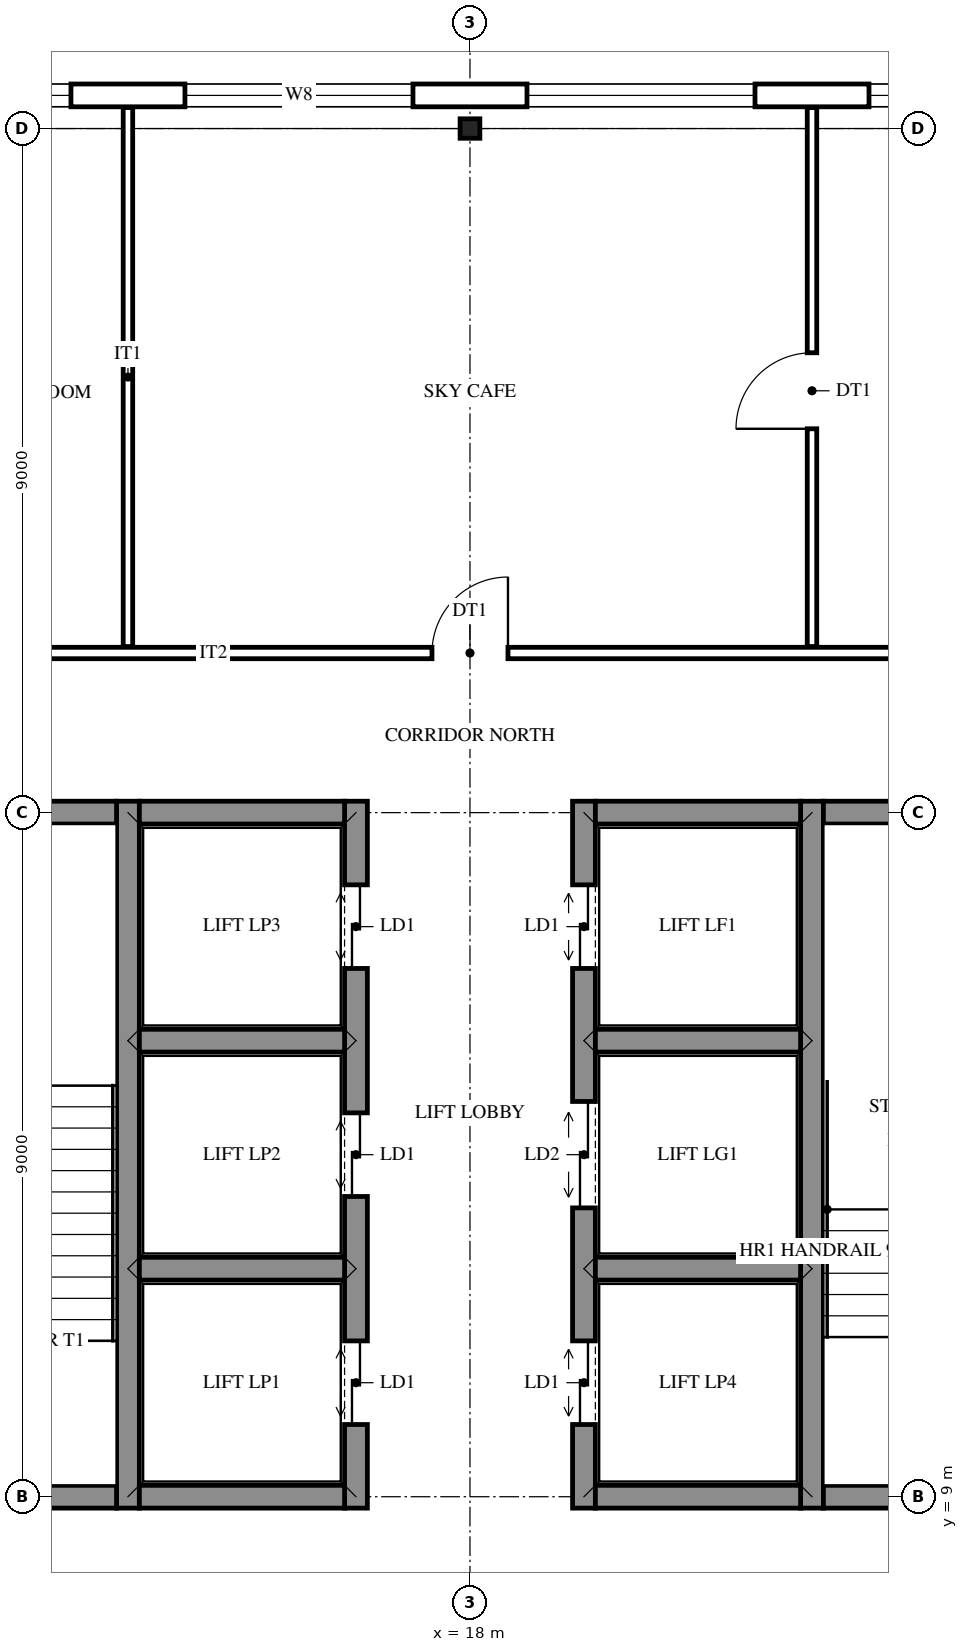
"""IFC4 building model, lengths in metres.
Left out: names, types, materials, properties, quantities, classifications, styles, units other than length and angle.
Written with IfcOpenShell. Run it as: python <this file> out.ifc"""

import sys

from ifc_helpers import new_model, si_unit, direction, frame, frame_2d, origin, origin_2d, place, context, subcontext, project, spatial, rectangle, i_section, extrude, element, fill, save


model = new_model("IFC4")
c1 = context("Model", 3, precision=1e-05, world=origin(), true_north=direction((0.0, 1.0)))
c2 = subcontext(c1, "Body", "Model", "MODEL_VIEW")
j1 = project(units=[si_unit("LENGTHUNIT", "METRE"), si_unit("PLANEANGLEUNIT", "RADIAN")], contexts=[c1])
p1 = place(None, origin())
s1 = spatial("IfcSite", under=j1, at=p1, CompositionType="ELEMENT")
p2 = place(p1, origin())
s2 = spatial("IfcBuilding", under=s1, at=p2, CompositionType="ELEMENT")
p3 = place(p2, frame((0.0, 0.0, 65.4)))
s3 = spatial("IfcBuildingStorey", under=s2, at=p3, CompositionType="ELEMENT", Elevation=65.4)
p4 = place(p3, frame((18.0, 27.0, 0.0), z_axis=(0.0, 0.0, 1.0), x_axis=(0.0, 1.0, 0.0)))
e1 = element("IfcColumn", 1, at=p4, inside=s3, PredefinedType="COLUMN", context=c2, shape_type="SweptSolid", body=[
    extrude(i_section(OverallWidth=0.256, OverallDepth=0.26, WebThickness=0.01, FlangeThickness=0.017, FilletRadius=0.014, at=origin_2d()), origin(), (0.0, 0.0, 1.0), 4.5),
])
p5 = place(p3, frame((13.5, 8.85, 0.0), z_axis=(0.0, 0.0, 1.0), x_axis=(0.0, 1.0, 0.0)))
e2 = element("IfcWall", 2, at=p5, inside=s3, PredefinedType="SHEAR", context=c2, shape_type="SweptSolid", body=[
    extrude(rectangle(XDim=9.3, YDim=0.3, at=frame_2d((4.65, 0.0))), origin(), (0.0, 0.0, 1.0), 4.5),
])
p6 = place(p3, frame((16.5, 8.85, 0.0), z_axis=(0.0, 0.0, 1.0), x_axis=(0.0, 1.0, 0.0)))
e3 = element("IfcWall", 3, at=p6, inside=s3, PredefinedType="SHEAR", context=c2, shape_type="SweptSolid", body=[
    extrude(rectangle(XDim=9.3, YDim=0.3, at=frame_2d((4.65, 0.0))), origin(), (0.0, 0.0, 1.0), 4.5),
])
p7 = place(p6, frame((1.1, 0.0, 0.0)))
e4 = element("IfcOpeningElement", 4, at=p7, cuts=e3, PredefinedType="OPENING", context=c2, shape_type="SweptSolid", body=[
    extrude(rectangle(XDim=1.1, YDim=2.1, at=frame_2d((0.55, 1.05))), frame((0.0, 0.16, 0.0), z_axis=(0.0, -1.0, 0.0), x_axis=(1.0, 0.0, 0.0)), (0.0, 0.0, 1.0), 0.32),
])
p8 = place(p6, frame((4.1, 0.0, 0.0)))
e5 = element("IfcOpeningElement", 5, at=p8, cuts=e3, PredefinedType="OPENING", context=c2, shape_type="SweptSolid", body=[
    extrude(rectangle(XDim=1.1, YDim=2.1, at=frame_2d((0.55, 1.05))), frame((0.0, 0.16, 0.0), z_axis=(0.0, -1.0, 0.0), x_axis=(1.0, 0.0, 0.0)), (0.0, 0.0, 1.0), 0.32),
])
p9 = place(p6, frame((7.1, 0.0, 0.0)))
e6 = element("IfcOpeningElement", 6, at=p9, cuts=e3, PredefinedType="OPENING", context=c2, shape_type="SweptSolid", body=[
    extrude(rectangle(XDim=1.1, YDim=2.1, at=frame_2d((0.55, 1.05))), frame((0.0, 0.16, 0.0), z_axis=(0.0, -1.0, 0.0), x_axis=(1.0, 0.0, 0.0)), (0.0, 0.0, 1.0), 0.32),
])
p10 = place(p3, frame((19.5, 8.85, 0.0), z_axis=(0.0, 0.0, 1.0), x_axis=(0.0, 1.0, 0.0)))
e7 = element("IfcWall", 7, at=p10, inside=s3, PredefinedType="SHEAR", context=c2, shape_type="SweptSolid", body=[
    extrude(rectangle(XDim=9.3, YDim=0.3, at=frame_2d((4.65, 0.0))), origin(), (0.0, 0.0, 1.0), 4.5),
])
p11 = place(p10, frame((1.1, 0.0, 0.0)))
e8 = element("IfcOpeningElement", 8, at=p11, cuts=e7, PredefinedType="OPENING", context=c2, shape_type="SweptSolid", body=[
    extrude(rectangle(XDim=1.1, YDim=2.1, at=frame_2d((0.55, 1.05))), frame((0.0, 0.16, 0.0), z_axis=(0.0, -1.0, 0.0), x_axis=(1.0, 0.0, 0.0)), (0.0, 0.0, 1.0), 0.32),
])
p12 = place(p10, frame((3.95, 0.0, 0.0)))
e9 = element("IfcOpeningElement", 9, at=p12, cuts=e7, PredefinedType="OPENING", context=c2, shape_type="SweptSolid", body=[
    extrude(rectangle(XDim=1.4, YDim=2.1, at=frame_2d((0.7, 1.05))), frame((0.0, 0.16, 0.0), z_axis=(0.0, -1.0, 0.0), x_axis=(1.0, 0.0, 0.0)), (0.0, 0.0, 1.0), 0.32),
])
p13 = place(p10, frame((7.1, 0.0, 0.0)))
e10 = element("IfcOpeningElement", 10, at=p13, cuts=e7, PredefinedType="OPENING", context=c2, shape_type="SweptSolid", body=[
    extrude(rectangle(XDim=1.1, YDim=2.1, at=frame_2d((0.55, 1.05))), frame((0.0, 0.16, 0.0), z_axis=(0.0, -1.0, 0.0), x_axis=(1.0, 0.0, 0.0)), (0.0, 0.0, 1.0), 0.32),
])
p14 = place(p3, frame((22.5, 8.85, 0.0), z_axis=(0.0, 0.0, 1.0), x_axis=(0.0, 1.0, 0.0)))
e11 = element("IfcWall", 11, at=p14, inside=s3, PredefinedType="SHEAR", context=c2, shape_type="SweptSolid", body=[
    extrude(rectangle(XDim=9.3, YDim=0.3, at=frame_2d((4.65, 0.0))), origin(), (0.0, 0.0, 1.0), 4.5),
])
p15 = place(p3, frame((9.15, 9.0, 0.0), z_axis=(0.0, 0.0, 1.0), x_axis=(1.0, 0.0, 0.0)))
e12 = element("IfcWall", 12, at=p15, inside=s3, PredefinedType="SHEAR", context=c2, shape_type="SweptSolid", body=[
    extrude(rectangle(XDim=4.2, YDim=0.3, at=frame_2d((2.1, 0.0))), origin(), (0.0, 0.0, 1.0), 4.5),
])
p16 = place(p15, frame((1.5, 0.0, 0.0)))
e13 = element("IfcOpeningElement", 13, at=p16, cuts=e12, PredefinedType="OPENING", context=c2, shape_type="SweptSolid", body=[
    extrude(rectangle(XDim=1.2, YDim=2.1, at=frame_2d((0.6, 1.05))), frame((0.0, 0.16, 0.0), z_axis=(0.0, -1.0, 0.0), x_axis=(1.0, 0.0, 0.0)), (0.0, 0.0, 1.0), 0.32),
])
for number, where, z_axis, x_axis in (
    (14, (13.65, 9.0, 0.0), (0.0, 0.0, 1.0), (1.0, 0.0, 0.0)),
    (15, (19.65, 9.0, 0.0), (0.0, 0.0, 1.0), (1.0, 0.0, 0.0)),
):
    element("IfcWall", number, at=place(p3, frame(where, z_axis=z_axis, x_axis=x_axis)), inside=s3, PredefinedType="SHEAR", context=c2, shape_type="SweptSolid", body=[
        extrude(rectangle(XDim=2.7, YDim=0.3, at=frame_2d((1.35, 0.0))), origin(), (0.0, 0.0, 1.0), 4.5),
    ])
p17 = place(p3, frame((22.65, 9.0, 0.0), z_axis=(0.0, 0.0, 1.0), x_axis=(1.0, 0.0, 0.0)))
e16 = element("IfcWall", 16, at=p17, inside=s3, PredefinedType="SHEAR", context=c2, shape_type="SweptSolid", body=[
    extrude(rectangle(XDim=4.2, YDim=0.3, at=frame_2d((2.1, 0.0))), origin(), (0.0, 0.0, 1.0), 4.5),
])
p18 = place(p17, frame((1.5, 0.0, 0.0)))
e17 = element("IfcOpeningElement", 17, at=p18, cuts=e16, PredefinedType="OPENING", context=c2, shape_type="SweptSolid", body=[
    extrude(rectangle(XDim=1.2, YDim=2.1, at=frame_2d((0.6, 1.05))), frame((0.0, 0.16, 0.0), z_axis=(0.0, -1.0, 0.0), x_axis=(1.0, 0.0, 0.0)), (0.0, 0.0, 1.0), 0.32),
])
for number, where, z_axis, x_axis in (
    (18, (13.65, 12.0, 0.0), (0.0, 0.0, 1.0), (1.0, 0.0, 0.0)),
    (19, (19.65, 12.0, 0.0), (0.0, 0.0, 1.0), (1.0, 0.0, 0.0)),
    (20, (13.65, 15.0, 0.0), (0.0, 0.0, 1.0), (1.0, 0.0, 0.0)),
    (21, (19.65, 15.0, 0.0), (0.0, 0.0, 1.0), (1.0, 0.0, 0.0)),
):
    element("IfcWall", number, at=place(p3, frame(where, z_axis=z_axis, x_axis=x_axis)), inside=s3, PredefinedType="SHEAR", context=c2, shape_type="SweptSolid", body=[
        extrude(rectangle(XDim=2.7, YDim=0.3, at=frame_2d((1.35, 0.0))), origin(), (0.0, 0.0, 1.0), 4.5),
    ])
p19 = place(p3, frame((9.15, 18.0, 0.0), z_axis=(0.0, 0.0, 1.0), x_axis=(1.0, 0.0, 0.0)))
e22 = element("IfcWall", 22, at=p19, inside=s3, PredefinedType="SHEAR", context=c2, shape_type="SweptSolid", body=[
    extrude(rectangle(XDim=4.2, YDim=0.3, at=frame_2d((2.1, 0.0))), origin(), (0.0, 0.0, 1.0), 4.5),
])
for number, where, z_axis, x_axis in (
    (23, (13.65, 18.0, 0.0), (0.0, 0.0, 1.0), (1.0, 0.0, 0.0)),
    (24, (19.65, 18.0, 0.0), (0.0, 0.0, 1.0), (1.0, 0.0, 0.0)),
):
    element("IfcWall", number, at=place(p3, frame(where, z_axis=z_axis, x_axis=x_axis)), inside=s3, PredefinedType="SHEAR", context=c2, shape_type="SweptSolid", body=[
        extrude(rectangle(XDim=2.7, YDim=0.3, at=frame_2d((1.35, 0.0))), origin(), (0.0, 0.0, 1.0), 4.5),
    ])
p20 = place(p3, frame((22.65, 18.0, 0.0), z_axis=(0.0, 0.0, 1.0), x_axis=(1.0, 0.0, 0.0)))
e25 = element("IfcWall", 25, at=p20, inside=s3, PredefinedType="SHEAR", context=c2, shape_type="SweptSolid", body=[
    extrude(rectangle(XDim=4.2, YDim=0.3, at=frame_2d((2.1, 0.0))), origin(), (0.0, 0.0, 1.0), 4.5),
])
p21 = place(p3, frame((8.414, 27.436, 0.0), z_axis=(0.0, 0.0, 1.0), x_axis=(1.0, 0.0, 0.0)))
e26 = element("IfcWall", 26, at=p21, inside=s3, PredefinedType="STANDARD", context=c2, shape_type="SweptSolid", body=[
    extrude(rectangle(XDim=19.172, YDim=0.3, at=frame_2d((9.586, 0.0))), origin(), (0.0, 0.0, 1.0), 4.5),
])
p22 = place(p21, frame((1.336, 0.0, 0.6)))
e27 = element("IfcOpeningElement", 27, at=p22, cuts=e26, PredefinedType="OPENING", context=c2, shape_type="SweptSolid", body=[
    extrude(rectangle(XDim=3.0, YDim=3.1, at=frame_2d((1.5, 1.55))), frame((0.0, 0.16, 0.0), z_axis=(0.0, -1.0, 0.0), x_axis=(1.0, 0.0, 0.0)), (0.0, 0.0, 1.0), 0.32),
])
p23 = place(p21, frame((5.836, 0.0, 0.6)))
e28 = element("IfcOpeningElement", 28, at=p23, cuts=e26, PredefinedType="OPENING", context=c2, shape_type="SweptSolid", body=[
    extrude(rectangle(XDim=3.0, YDim=3.1, at=frame_2d((1.5, 1.55))), frame((0.0, 0.16, 0.0), z_axis=(0.0, -1.0, 0.0), x_axis=(1.0, 0.0, 0.0)), (0.0, 0.0, 1.0), 0.32),
])
p24 = place(p21, frame((10.336, 0.0, 0.6)))
e29 = element("IfcOpeningElement", 29, at=p24, cuts=e26, PredefinedType="OPENING", context=c2, shape_type="SweptSolid", body=[
    extrude(rectangle(XDim=3.0, YDim=3.1, at=frame_2d((1.5, 1.55))), frame((0.0, 0.16, 0.0), z_axis=(0.0, -1.0, 0.0), x_axis=(1.0, 0.0, 0.0)), (0.0, 0.0, 1.0), 0.32),
])
p25 = place(p21, frame((14.836, 0.0, 0.6)))
e30 = element("IfcOpeningElement", 30, at=p25, cuts=e26, PredefinedType="OPENING", context=c2, shape_type="SweptSolid", body=[
    extrude(rectangle(XDim=3.0, YDim=3.1, at=frame_2d((1.5, 1.55))), frame((0.0, 0.16, 0.0), z_axis=(0.0, -1.0, 0.0), x_axis=(1.0, 0.0, 0.0)), (0.0, 0.0, 1.0), 0.32),
])
p26 = place(p3, frame((13.5, 20.185, 0.0), z_axis=(0.0, 0.0, 1.0), x_axis=(0.0, 1.0, 0.0)))
e31 = element("IfcWall", 31, at=p26, inside=s3, PredefinedType="PARTITIONING", context=c2, shape_type="SweptSolid", body=[
    extrude(rectangle(XDim=7.091, YDim=0.125, at=frame_2d((3.545, 0.0))), origin(), (0.0, 0.0, 1.0), 3.723),
])
p27 = place(p3, frame((22.5, 20.185, 0.0), z_axis=(0.0, 0.0, 1.0), x_axis=(0.0, 1.0, 0.0)))
e32 = element("IfcWall", 32, at=p27, inside=s3, PredefinedType="PARTITIONING", context=c2, shape_type="SweptSolid", body=[
    extrude(rectangle(XDim=7.091, YDim=0.125, at=frame_2d((3.545, 0.0))), origin(), (0.0, 0.0, 1.0), 3.723),
])
p28 = place(p27, frame((2.865, 0.0, 0.0)))
e33 = element("IfcOpeningElement", 33, at=p28, cuts=e32, PredefinedType="OPENING", context=c2, shape_type="SweptSolid", body=[
    extrude(rectangle(XDim=1.0, YDim=2.1, at=frame_2d((0.5, 1.05))), frame((0.0, 0.073, 0.0), z_axis=(0.0, -1.0, 0.0), x_axis=(1.0, 0.0, 0.0)), (0.0, 0.0, 1.0), 0.145),
])
p29 = place(p3, frame((8.724, 20.1, 0.0), z_axis=(0.0, 0.0, 1.0), x_axis=(1.0, 0.0, 0.0)))
e34 = element("IfcWall", 34, at=p29, inside=s3, PredefinedType="PARTITIONING", context=c2, shape_type="SweptSolid", body=[
    extrude(rectangle(XDim=18.552, YDim=0.15, at=frame_2d((9.276, 0.0))), origin(), (0.0, 0.0, 1.0), 3.723),
])
p30 = place(p29, frame((2.026, 0.0, 0.0)))
e35 = element("IfcOpeningElement", 35, at=p30, cuts=e34, PredefinedType="OPENING", context=c2, shape_type="SweptSolid", body=[
    extrude(rectangle(XDim=1.0, YDim=2.1, at=frame_2d((0.5, 1.05))), frame((0.0, 0.085, 0.0), z_axis=(0.0, -1.0, 0.0), x_axis=(1.0, 0.0, 0.0)), (0.0, 0.0, 1.0), 0.17),
])
p31 = place(p29, frame((8.776, 0.0, 0.0)))
e36 = element("IfcOpeningElement", 36, at=p31, cuts=e34, PredefinedType="OPENING", context=c2, shape_type="SweptSolid", body=[
    extrude(rectangle(XDim=1.0, YDim=2.1, at=frame_2d((0.5, 1.05))), frame((0.0, 0.085, 0.0), z_axis=(0.0, -1.0, 0.0), x_axis=(1.0, 0.0, 0.0)), (0.0, 0.0, 1.0), 0.17),
])
p32 = place(p29, frame((15.526, 0.0, 0.0)))
e37 = element("IfcOpeningElement", 37, at=p32, cuts=e34, PredefinedType="OPENING", context=c2, shape_type="SweptSolid", body=[
    extrude(rectangle(XDim=1.0, YDim=2.1, at=frame_2d((0.5, 1.05))), frame((0.0, 0.085, 0.0), z_axis=(0.0, -1.0, 0.0), x_axis=(1.0, 0.0, 0.0)), (0.0, 0.0, 1.0), 0.17),
])
p33 = place(p22, origin())
e38 = element("IfcWindow", 38, at=p33, inside=s3, PartitioningType="SINGLE_PANEL", PredefinedType="WINDOW", context=c2, shape_type="SweptSolid", body=[
    extrude(rectangle(XDim=3.0, YDim=3.1, at=frame_2d((1.5, 1.55))), frame((0.0, 0.03, 0.0), z_axis=(0.0, -1.0, 0.0), x_axis=(1.0, 0.0, 0.0)), (0.0, 0.0, 1.0), 0.06),
])
fill(e27, e38)
p34 = place(p23, origin())
e39 = element("IfcWindow", 39, at=p34, inside=s3, PartitioningType="SINGLE_PANEL", PredefinedType="WINDOW", context=c2, shape_type="SweptSolid", body=[
    extrude(rectangle(XDim=3.0, YDim=3.1, at=frame_2d((1.5, 1.55))), frame((0.0, 0.03, 0.0), z_axis=(0.0, -1.0, 0.0), x_axis=(1.0, 0.0, 0.0)), (0.0, 0.0, 1.0), 0.06),
])
fill(e28, e39)
p35 = place(p24, origin())
e40 = element("IfcWindow", 40, at=p35, inside=s3, PartitioningType="SINGLE_PANEL", PredefinedType="WINDOW", context=c2, shape_type="SweptSolid", body=[
    extrude(rectangle(XDim=3.0, YDim=3.1, at=frame_2d((1.5, 1.55))), frame((0.0, 0.03, 0.0), z_axis=(0.0, -1.0, 0.0), x_axis=(1.0, 0.0, 0.0)), (0.0, 0.0, 1.0), 0.06),
])
fill(e29, e40)
p36 = place(p25, origin())
e41 = element("IfcWindow", 41, at=p36, inside=s3, PartitioningType="SINGLE_PANEL", PredefinedType="WINDOW", context=c2, shape_type="SweptSolid", body=[
    extrude(rectangle(XDim=3.0, YDim=3.1, at=frame_2d((1.5, 1.55))), frame((0.0, 0.03, 0.0), z_axis=(0.0, -1.0, 0.0), x_axis=(1.0, 0.0, 0.0)), (0.0, 0.0, 1.0), 0.06),
])
fill(e30, e41)
p37 = place(p31, origin())
e42 = element("IfcDoor", 42, at=p37, inside=s3, OperationType="SINGLE_SWING_RIGHT", PredefinedType="DOOR", context=c2, shape_type="SweptSolid", body=[
    extrude(rectangle(XDim=1.0, YDim=2.1, at=frame_2d((0.5, 1.05))), frame((0.0, 0.025, 0.0), z_axis=(0.0, -1.0, 0.0), x_axis=(1.0, 0.0, 0.0)), (0.0, 0.0, 1.0), 0.05),
])
fill(e36, e42)
p38 = place(p28, frame((1.0, 0.0, 0.0), z_axis=(0.0, 0.0, 1.0), x_axis=(-1.0, 0.0, 0.0)))
e43 = element("IfcDoor", 43, at=p38, inside=s3, OperationType="SINGLE_SWING_LEFT", PredefinedType="DOOR", context=c2, shape_type="SweptSolid", body=[
    extrude(rectangle(XDim=1.0, YDim=2.1, at=frame_2d((0.5, 1.05))), frame((0.0, 0.025, 0.0), z_axis=(0.0, -1.0, 0.0), x_axis=(1.0, 0.0, 0.0)), (0.0, 0.0, 1.0), 0.05),
])
fill(e33, e43)
p39 = place(p7, origin())
e44 = element("IfcDoor", 44, at=p39, inside=s3, OperationType="DOUBLE_DOOR_SLIDING", PredefinedType="DOOR", context=c2, shape_type="SweptSolid", body=[
    extrude(rectangle(XDim=1.1, YDim=2.1, at=frame_2d((0.55, 1.05))), frame((0.0, 0.025, 0.0), z_axis=(0.0, -1.0, 0.0), x_axis=(1.0, 0.0, 0.0)), (0.0, 0.0, 1.0), 0.05),
])
fill(e4, e44)
p40 = place(p11, origin())
e45 = element("IfcDoor", 45, at=p40, inside=s3, OperationType="DOUBLE_DOOR_SLIDING", PredefinedType="DOOR", context=c2, shape_type="SweptSolid", body=[
    extrude(rectangle(XDim=1.1, YDim=2.1, at=frame_2d((0.55, 1.05))), frame((0.0, 0.025, 0.0), z_axis=(0.0, -1.0, 0.0), x_axis=(1.0, 0.0, 0.0)), (0.0, 0.0, 1.0), 0.05),
])
fill(e8, e45)
p41 = place(p8, origin())
e46 = element("IfcDoor", 46, at=p41, inside=s3, OperationType="DOUBLE_DOOR_SLIDING", PredefinedType="DOOR", context=c2, shape_type="SweptSolid", body=[
    extrude(rectangle(XDim=1.1, YDim=2.1, at=frame_2d((0.55, 1.05))), frame((0.0, 0.025, 0.0), z_axis=(0.0, -1.0, 0.0), x_axis=(1.0, 0.0, 0.0)), (0.0, 0.0, 1.0), 0.05),
])
fill(e5, e46)
p42 = place(p12, origin())
e47 = element("IfcDoor", 47, at=p42, inside=s3, OperationType="DOUBLE_DOOR_SLIDING", PredefinedType="DOOR", context=c2, shape_type="SweptSolid", body=[
    extrude(rectangle(XDim=1.4, YDim=2.1, at=frame_2d((0.7, 1.05))), frame((0.0, 0.025, 0.0), z_axis=(0.0, -1.0, 0.0), x_axis=(1.0, 0.0, 0.0)), (0.0, 0.0, 1.0), 0.05),
])
fill(e9, e47)
p43 = place(p9, origin())
e48 = element("IfcDoor", 48, at=p43, inside=s3, OperationType="DOUBLE_DOOR_SLIDING", PredefinedType="DOOR", context=c2, shape_type="SweptSolid", body=[
    extrude(rectangle(XDim=1.1, YDim=2.1, at=frame_2d((0.55, 1.05))), frame((0.0, 0.025, 0.0), z_axis=(0.0, -1.0, 0.0), x_axis=(1.0, 0.0, 0.0)), (0.0, 0.0, 1.0), 0.05),
])
fill(e6, e48)
p44 = place(p13, origin())
e49 = element("IfcDoor", 49, at=p44, inside=s3, OperationType="DOUBLE_DOOR_SLIDING", PredefinedType="DOOR", context=c2, shape_type="SweptSolid", body=[
    extrude(rectangle(XDim=1.1, YDim=2.1, at=frame_2d((0.55, 1.05))), frame((0.0, 0.025, 0.0), z_axis=(0.0, -1.0, 0.0), x_axis=(1.0, 0.0, 0.0)), (0.0, 0.0, 1.0), 0.05),
])
fill(e10, e49)
save(model, sys.argv[1])
